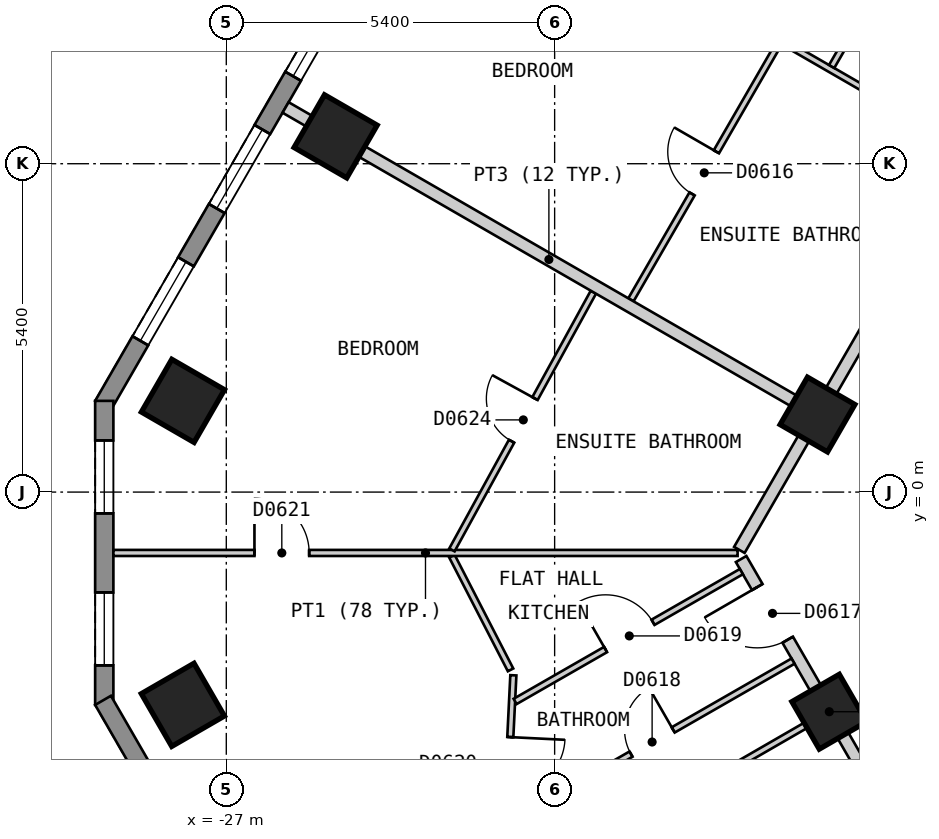
"""IFC4 building model, lengths in metres.
Left out: names, types, materials, properties, quantities, classifications, styles, units other than length and angle.
Written with IfcOpenShell. Run it as: python <this file> out.ifc"""

import sys

from ifc_helpers import new_model, si_unit, direction, frame, frame_2d, origin, origin_2d, place, context, subcontext, project, spatial, polyline, rectangle, outline, extrude, element, fill, save


model = new_model("IFC4")
c1 = context("Model", 3, precision=1e-05, world=origin(), true_north=direction((0.0, 1.0)))
c2 = subcontext(c1, "Body", "Model", "MODEL_VIEW")
j1 = project(units=[si_unit("LENGTHUNIT", "METRE"), si_unit("PLANEANGLEUNIT", "RADIAN")], contexts=[c1])
p1 = place(None, origin())
s1 = spatial("IfcSite", under=j1, at=p1, CompositionType="ELEMENT")
p2 = place(p1, origin())
s2 = spatial("IfcBuilding", under=s1, at=p2, CompositionType="ELEMENT")
p3 = place(p2, frame((0.0, 0.0, 81.0)))
s3 = spatial("IfcBuildingStorey", under=s2, at=p3, CompositionType="ELEMENT", Elevation=81.0)
for number, where, z_axis, x_axis in (
    (1, (-25.202, 5.85, 0.0), (0.0, 0.0, 1.0), (-0.5, -0.866, 0.0)),
    (2, (-27.713, 1.5, 0.0), (0.0, 0.0, 1.0), (-0.5, -0.866, 0.0)),
    (3, (-27.714, -3.499, 0.0), (0.0, 0.0, 1.0), (0.5, -0.866, 0.0)),
):
    element("IfcColumn", number, at=place(p3, frame(where, z_axis=z_axis, x_axis=x_axis)), inside=s3, PredefinedType="COLUMN", context=c2, shape_type="SweptSolid", body=[
        extrude(rectangle(XDim=1.0, YDim=1.0, at=origin_2d()), origin(), (0.0, 0.0, 1.0), 3.0),
    ])
for number, where, z_axis, x_axis in (
    (4, (-17.083, -3.612, 0.0), (0.0, 0.0, 1.0), (0.5, -0.866, 0.0)),
    (5, (-17.277, 1.275, 0.0), (0.0, 0.0, 1.0), (-0.5, -0.866, 0.0)),
):
    element("IfcColumn", number, at=place(p3, frame(where, z_axis=z_axis, x_axis=x_axis)), inside=s3, PredefinedType="COLUMN", context=c2, shape_type="SweptSolid", body=[
        extrude(rectangle(XDim=0.9, YDim=0.9, at=origin_2d()), origin(), (0.0, 0.0, 1.0), 3.0),
    ])
p4 = place(p3, frame((-15.747, 24.425, 0.0), z_axis=(0.0, 0.0, 1.0), x_axis=(-0.500027479704, -0.866009537788, 0.0)))
e6 = element("IfcWall", 6, at=p4, inside=s3, PredefinedType="SOLIDWALL", context=c2, shape_type="SweptSolid", body=[
    extrude(outline(polyline([(0.0, -0.15), (26.559, -0.15), (26.478, 0.15), (0.08, 0.15), (0.0, -0.15)])), origin(), (0.0, 0.0, 1.0), 2.7),
])
p5 = place(p4, frame((1.227, 0.0, 0.15)))
e7 = element("IfcOpeningElement", 7, at=p5, cuts=e6, PredefinedType="OPENING", context=c2, shape_type="SweptSolid", body=[
    extrude(rectangle(XDim=1.5, YDim=2.1, at=frame_2d((0.75, 1.05))), frame((0.0, 0.16, 0.0), z_axis=(0.0, -1.0, 0.0), x_axis=(1.0, 0.0, 0.0)), (0.0, 0.0, 1.0), 0.32),
])
p6 = place(p4, frame((3.739, 0.0, 0.15)))
e8 = element("IfcOpeningElement", 8, at=p6, cuts=e6, PredefinedType="OPENING", context=c2, shape_type="SweptSolid", body=[
    extrude(rectangle(XDim=1.5, YDim=2.1, at=frame_2d((0.75, 1.05))), frame((0.0, 0.16, 0.0), z_axis=(0.0, -1.0, 0.0), x_axis=(1.0, 0.0, 0.0)), (0.0, 0.0, 1.0), 0.32),
])
p7 = place(p4, frame((6.25, 0.0, 0.15)))
e9 = element("IfcOpeningElement", 9, at=p7, cuts=e6, PredefinedType="OPENING", context=c2, shape_type="SweptSolid", body=[
    extrude(rectangle(XDim=1.5, YDim=2.1, at=frame_2d((0.75, 1.05))), frame((0.0, 0.16, 0.0), z_axis=(0.0, -1.0, 0.0), x_axis=(1.0, 0.0, 0.0)), (0.0, 0.0, 1.0), 0.32),
])
p8 = place(p4, frame((8.761, 0.0, 0.15)))
e10 = element("IfcOpeningElement", 10, at=p8, cuts=e6, PredefinedType="OPENING", context=c2, shape_type="SweptSolid", body=[
    extrude(rectangle(XDim=1.5, YDim=2.1, at=frame_2d((0.75, 1.05))), frame((0.0, 0.16, 0.0), z_axis=(0.0, -1.0, 0.0), x_axis=(1.0, 0.0, 0.0)), (0.0, 0.0, 1.0), 0.32),
])
p9 = place(p4, frame((11.273, 0.0, 0.15)))
e11 = element("IfcOpeningElement", 11, at=p9, cuts=e6, PredefinedType="OPENING", context=c2, shape_type="SweptSolid", body=[
    extrude(rectangle(XDim=1.5, YDim=2.1, at=frame_2d((0.75, 1.05))), frame((0.0, 0.16, 0.0), z_axis=(0.0, -1.0, 0.0), x_axis=(1.0, 0.0, 0.0)), (0.0, 0.0, 1.0), 0.32),
])
p10 = place(p4, frame((13.785, 0.0, 0.15)))
e12 = element("IfcOpeningElement", 12, at=p10, cuts=e6, PredefinedType="OPENING", context=c2, shape_type="SweptSolid", body=[
    extrude(rectangle(XDim=1.5, YDim=2.1, at=frame_2d((0.75, 1.05))), frame((0.0, 0.16, 0.0), z_axis=(0.0, -1.0, 0.0), x_axis=(1.0, 0.0, 0.0)), (0.0, 0.0, 1.0), 0.32),
])
p11 = place(p4, frame((16.296, 0.0, 0.15)))
e13 = element("IfcOpeningElement", 13, at=p11, cuts=e6, PredefinedType="OPENING", context=c2, shape_type="SweptSolid", body=[
    extrude(rectangle(XDim=1.5, YDim=2.1, at=frame_2d((0.75, 1.05))), frame((0.0, 0.16, 0.0), z_axis=(0.0, -1.0, 0.0), x_axis=(1.0, 0.0, 0.0)), (0.0, 0.0, 1.0), 0.32),
])
p12 = place(p4, frame((18.807, 0.0, 0.15)))
e14 = element("IfcOpeningElement", 14, at=p12, cuts=e6, PredefinedType="OPENING", context=c2, shape_type="SweptSolid", body=[
    extrude(rectangle(XDim=1.5, YDim=2.1, at=frame_2d((0.75, 1.05))), frame((0.0, 0.16, 0.0), z_axis=(0.0, -1.0, 0.0), x_axis=(1.0, 0.0, 0.0)), (0.0, 0.0, 1.0), 0.32),
])
p13 = place(p4, frame((21.319, 0.0, 0.15)))
e15 = element("IfcOpeningElement", 15, at=p13, cuts=e6, PredefinedType="OPENING", context=c2, shape_type="SweptSolid", body=[
    extrude(rectangle(XDim=1.5, YDim=2.1, at=frame_2d((0.75, 1.05))), frame((0.0, 0.16, 0.0), z_axis=(0.0, -1.0, 0.0), x_axis=(1.0, 0.0, 0.0)), (0.0, 0.0, 1.0), 0.32),
])
p14 = place(p4, frame((23.831, 0.0, 0.15)))
e16 = element("IfcOpeningElement", 16, at=p14, cuts=e6, PredefinedType="OPENING", context=c2, shape_type="SweptSolid", body=[
    extrude(rectangle(XDim=1.5, YDim=2.1, at=frame_2d((0.75, 1.05))), frame((0.0, 0.16, 0.0), z_axis=(0.0, -1.0, 0.0), x_axis=(1.0, 0.0, 0.0)), (0.0, 0.0, 1.0), 0.32),
])
p15 = place(p3, frame((-29.007, 1.5, 0.0), z_axis=(0.0, 0.0, 1.0), x_axis=(0.0, -1.0, 0.0)))
e17 = element("IfcWall", 17, at=p15, inside=s3, PredefinedType="SOLIDWALL", context=c2, shape_type="SweptSolid", body=[
    extrude(outline(polyline([(0.0, -0.15), (5.0, -0.15), (4.92, 0.15), (0.08, 0.15), (0.0, -0.15)])), origin(), (0.0, 0.0, 1.0), 2.7),
])
p16 = place(p15, frame((0.65, 0.0, 0.15)))
e18 = element("IfcOpeningElement", 18, at=p16, cuts=e17, PredefinedType="OPENING", context=c2, shape_type="SweptSolid", body=[
    extrude(rectangle(XDim=1.2, YDim=2.1, at=frame_2d((0.6, 1.05))), frame((0.0, 0.16, 0.0), z_axis=(0.0, -1.0, 0.0), x_axis=(1.0, 0.0, 0.0)), (0.0, 0.0, 1.0), 0.32),
])
p17 = place(p15, frame((3.15, 0.0, 0.15)))
e19 = element("IfcOpeningElement", 19, at=p17, cuts=e17, PredefinedType="OPENING", context=c2, shape_type="SweptSolid", body=[
    extrude(rectangle(XDim=1.2, YDim=2.1, at=frame_2d((0.6, 1.05))), frame((0.0, 0.16, 0.0), z_axis=(0.0, -1.0, 0.0), x_axis=(1.0, 0.0, 0.0)), (0.0, 0.0, 1.0), 0.32),
])
p18 = place(p3, frame((-29.027, -3.425, 0.0), z_axis=(0.0, 0.0, 1.0), x_axis=(0.500035407905, -0.866004960056, 0.0)))
e20 = element("IfcWall", 20, at=p18, inside=s3, PredefinedType="SOLIDWALL", context=c2, shape_type="SweptSolid", body=[
    extrude(outline(polyline([(0.0, -0.15), (23.094, -0.15), (23.014, 0.15), (0.08, 0.15), (0.0, -0.15)])), origin(), (0.0, 0.0, 1.0), 2.7),
])
p19 = place(p18, frame((1.324, 0.0, 0.15)))
e21 = element("IfcOpeningElement", 21, at=p19, cuts=e20, PredefinedType="OPENING", context=c2, shape_type="SweptSolid", body=[
    extrude(rectangle(XDim=1.5, YDim=2.1, at=frame_2d((0.75, 1.05))), frame((0.0, 0.16, 0.0), z_axis=(0.0, -1.0, 0.0), x_axis=(1.0, 0.0, 0.0)), (0.0, 0.0, 1.0), 0.32),
])
p20 = place(p18, frame((4.031, 0.0, 0.15)))
e22 = element("IfcOpeningElement", 22, at=p20, cuts=e20, PredefinedType="OPENING", context=c2, shape_type="SweptSolid", body=[
    extrude(rectangle(XDim=1.5, YDim=2.1, at=frame_2d((0.75, 1.05))), frame((0.0, 0.16, 0.0), z_axis=(0.0, -1.0, 0.0), x_axis=(1.0, 0.0, 0.0)), (0.0, 0.0, 1.0), 0.32),
])
p21 = place(p18, frame((6.737, 0.0, 0.15)))
e23 = element("IfcOpeningElement", 23, at=p21, cuts=e20, PredefinedType="OPENING", context=c2, shape_type="SweptSolid", body=[
    extrude(rectangle(XDim=1.5, YDim=2.1, at=frame_2d((0.75, 1.05))), frame((0.0, 0.16, 0.0), z_axis=(0.0, -1.0, 0.0), x_axis=(1.0, 0.0, 0.0)), (0.0, 0.0, 1.0), 0.32),
])
p22 = place(p18, frame((9.444, 0.0, 0.15)))
e24 = element("IfcOpeningElement", 24, at=p22, cuts=e20, PredefinedType="OPENING", context=c2, shape_type="SweptSolid", body=[
    extrude(rectangle(XDim=1.5, YDim=2.1, at=frame_2d((0.75, 1.05))), frame((0.0, 0.16, 0.0), z_axis=(0.0, -1.0, 0.0), x_axis=(1.0, 0.0, 0.0)), (0.0, 0.0, 1.0), 0.32),
])
p23 = place(p18, frame((12.151, 0.0, 0.15)))
e25 = element("IfcOpeningElement", 25, at=p23, cuts=e20, PredefinedType="OPENING", context=c2, shape_type="SweptSolid", body=[
    extrude(rectangle(XDim=1.5, YDim=2.1, at=frame_2d((0.75, 1.05))), frame((0.0, 0.16, 0.0), z_axis=(0.0, -1.0, 0.0), x_axis=(1.0, 0.0, 0.0)), (0.0, 0.0, 1.0), 0.32),
])
p24 = place(p18, frame((14.857, 0.0, 0.15)))
e26 = element("IfcOpeningElement", 26, at=p24, cuts=e20, PredefinedType="OPENING", context=c2, shape_type="SweptSolid", body=[
    extrude(rectangle(XDim=1.5, YDim=2.1, at=frame_2d((0.75, 1.05))), frame((0.0, 0.16, 0.0), z_axis=(0.0, -1.0, 0.0), x_axis=(1.0, 0.0, 0.0)), (0.0, 0.0, 1.0), 0.32),
])
p25 = place(p18, frame((17.564, 0.0, 0.15)))
e27 = element("IfcOpeningElement", 27, at=p25, cuts=e20, PredefinedType="OPENING", context=c2, shape_type="SweptSolid", body=[
    extrude(rectangle(XDim=1.5, YDim=2.1, at=frame_2d((0.75, 1.05))), frame((0.0, 0.16, 0.0), z_axis=(0.0, -1.0, 0.0), x_axis=(1.0, 0.0, 0.0)), (0.0, 0.0, 1.0), 0.32),
])
p26 = place(p18, frame((20.27, 0.0, 0.15)))
e28 = element("IfcOpeningElement", 28, at=p26, cuts=e20, PredefinedType="OPENING", context=c2, shape_type="SweptSolid", body=[
    extrude(rectangle(XDim=1.5, YDim=2.1, at=frame_2d((0.75, 1.05))), frame((0.0, 0.16, 0.0), z_axis=(0.0, -1.0, 0.0), x_axis=(1.0, 0.0, 0.0)), (0.0, 0.0, 1.0), 0.32),
])
p27 = place(p3, frame((-18.533, -1.101, 0.0), z_axis=(0.0, 0.0, 1.0), x_axis=(0.500022085096, -0.866012652573, 0.0)))
e29 = element("IfcWall", 29, at=p27, inside=s3, PredefinedType="PARTITIONING", context=c2, shape_type="SweptSolid", body=[
    extrude(rectangle(XDim=6.066, YDim=0.2, at=frame_2d((3.033, 0.0))), origin(), (0.0, 0.0, 1.0), 2.7),
])
p28 = place(p27, frame((0.532, 0.0, 0.0)))
e30 = element("IfcOpeningElement", 30, at=p28, cuts=e29, PredefinedType="OPENING", context=c2, shape_type="SweptSolid", body=[
    extrude(rectangle(XDim=1.0, YDim=2.1, at=frame_2d((0.5, 1.05))), frame((0.0, 0.11, 0.0), z_axis=(0.0, -1.0, 0.0), x_axis=(1.0, 0.0, 0.0)), (0.0, 0.0, 1.0), 0.22),
])
p29 = place(p3, frame((-18.562, -0.951, 0.0), z_axis=(0.0, 0.0, 1.0), x_axis=(0.499992962407, 0.866029466902, 0.0)))
e31 = element("IfcWall", 31, at=p29, inside=s3, PredefinedType="PARTITIONING", context=c2, shape_type="SweptSolid", body=[
    extrude(rectangle(XDim=20.208, YDim=0.2, at=frame_2d((10.104, 0.0))), origin(), (0.0, 0.0, 1.0), 2.7),
])
p30 = place(p29, frame((9.604, 0.0, 0.0)))
e32 = element("IfcOpeningElement", 32, at=p30, cuts=e31, PredefinedType="OPENING", context=c2, shape_type="SweptSolid", body=[
    extrude(rectangle(XDim=1.0, YDim=2.1, at=frame_2d((0.5, 1.05))), frame((0.0, 0.11, 0.0), z_axis=(0.0, -1.0, 0.0), x_axis=(1.0, 0.0, 0.0)), (0.0, 0.0, 1.0), 0.22),
])
p31 = place(p3, frame((-23.289, -1.054, 0.0), z_axis=(0.0, 0.0, 1.0), x_axis=(0.458226112305, -0.888835659726, 0.0)))
e33 = element("IfcWall", 33, at=p31, inside=s3, PredefinedType="PARTITIONING", context=c2, shape_type="SweptSolid", body=[
    extrude(rectangle(XDim=2.104, YDim=0.1, at=frame_2d((1.052, 0.0))), origin(), (0.0, 0.0, 1.0), 2.7),
])
p32 = place(p3, frame((-23.513, 10.675, 0.0), z_axis=(0.0, 0.0, 1.0), x_axis=(0.866041268327, -0.499972520799, 0.0)))
e34 = element("IfcWall", 34, at=p32, inside=s3, PredefinedType="PARTITIONING", context=c2, shape_type="SweptSolid", body=[
    extrude(rectangle(XDim=10.0, YDim=0.1, at=frame_2d((5.0, 0.0))), origin(), (0.0, 0.0, 1.0), 2.7),
])
p33 = place(p32, frame((4.325, 0.0, 0.0)))
e35 = element("IfcOpeningElement", 35, at=p33, cuts=e34, PredefinedType="OPENING", context=c2, shape_type="SweptSolid", body=[
    extrude(rectangle(XDim=0.9, YDim=2.1, at=frame_2d((0.45, 1.05))), frame((0.0, 0.06, 0.0), z_axis=(0.0, -1.0, 0.0), x_axis=(1.0, 0.0, 0.0)), (0.0, 0.0, 1.0), 0.12),
])
p34 = place(p3, frame((-28.857, -1.001, 0.0), z_axis=(0.0, 0.0, 1.0), x_axis=(1.0, 0.0, 0.0)))
e36 = element("IfcWall", 36, at=p34, inside=s3, PredefinedType="PARTITIONING", context=c2, shape_type="SweptSolid", body=[
    extrude(rectangle(XDim=10.266, YDim=0.1, at=frame_2d((5.133, 0.0))), origin(), (0.0, 0.0, 1.0), 2.7),
])
p35 = place(p34, frame((2.32, 0.0, 0.0)))
e37 = element("IfcOpeningElement", 37, at=p35, cuts=e36, PredefinedType="OPENING", context=c2, shape_type="SweptSolid", body=[
    extrude(rectangle(XDim=0.9, YDim=2.1, at=frame_2d((0.45, 1.05))), frame((0.0, 0.06, 0.0), z_axis=(0.0, -1.0, 0.0), x_axis=(1.0, 0.0, 0.0)), (0.0, 0.0, 1.0), 0.12),
])
p36 = place(p3, frame((-17.044, 6.999, 0.0), z_axis=(0.0, 0.0, 1.0), x_axis=(0.500176309913, 0.865923587277, 0.0)))
e38 = element("IfcWall", 38, at=p36, inside=s3, PredefinedType="PARTITIONING", context=c2, shape_type="SweptSolid", body=[
    extrude(rectangle(XDim=3.213, YDim=0.1, at=frame_2d((1.606, 0.0))), origin(), (0.0, 0.0, 1.0), 2.7),
])
p37 = place(p3, frame((-20.345, 3.162, 0.0), z_axis=(0.0, 0.0, 1.0), x_axis=(0.499943653708, 0.866057932887, 0.0)))
e39 = element("IfcWall", 39, at=p37, inside=s3, PredefinedType="PARTITIONING", context=c2, shape_type="SweptSolid", body=[
    extrude(rectangle(XDim=4.873, YDim=0.1, at=frame_2d((2.436, 0.0))), origin(), (0.0, 0.0, 1.0), 2.7),
])
p38 = place(p37, frame((2.011, 0.0, 0.0)))
e40 = element("IfcOpeningElement", 40, at=p38, cuts=e39, PredefinedType="OPENING", context=c2, shape_type="SweptSolid", body=[
    extrude(rectangle(XDim=0.8, YDim=2.1, at=frame_2d((0.4, 1.05))), frame((0.0, 0.06, 0.0), z_axis=(0.0, -1.0, 0.0), x_axis=(1.0, 0.0, 0.0)), (0.0, 0.0, 1.0), 0.12),
])
p39 = place(p3, frame((-23.289, -0.951, 0.0), z_axis=(0.0, 0.0, 1.0), x_axis=(0.481164463081, 0.876630343684, 0.0)))
e41 = element("IfcWall", 41, at=p39, inside=s3, PredefinedType="PARTITIONING", context=c2, shape_type="SweptSolid", body=[
    extrude(rectangle(XDim=4.834, YDim=0.1, at=frame_2d((2.417, 0.0))), origin(), (0.0, 0.0, 1.0), 2.7),
])
p40 = place(p39, frame((2.039, 0.0, 0.0)))
e42 = element("IfcOpeningElement", 42, at=p40, cuts=e41, PredefinedType="OPENING", context=c2, shape_type="SweptSolid", body=[
    extrude(rectangle(XDim=0.8, YDim=2.1, at=frame_2d((0.4, 1.05))), frame((0.0, 0.06, 0.0), z_axis=(0.0, -1.0, 0.0), x_axis=(1.0, 0.0, 0.0)), (0.0, 0.0, 1.0), 0.12),
])
p41 = place(p3, frame((-22.399, -5.45, 0.0), z_axis=(0.0, 0.0, 1.0), x_axis=(0.049129140995, 0.998792434646, 0.0)))
e43 = element("IfcWall", 43, at=p41, inside=s3, PredefinedType="PARTITIONING", context=c2, shape_type="SweptSolid", body=[
    extrude(rectangle(XDim=2.44, YDim=0.1, at=frame_2d((1.22, 0.0))), origin(), (0.0, 0.0, 1.0), 2.7),
])
p42 = place(p41, frame((0.522, 0.0, 0.0)))
e44 = element("IfcOpeningElement", 44, at=p42, cuts=e43, PredefinedType="OPENING", context=c2, shape_type="SweptSolid", body=[
    extrude(rectangle(XDim=0.9, YDim=2.1, at=frame_2d((0.45, 1.05))), frame((0.0, 0.06, 0.0), z_axis=(0.0, -1.0, 0.0), x_axis=(1.0, 0.0, 0.0)), (0.0, 0.0, 1.0), 0.12),
])
p43 = place(p3, frame((-25.83, -8.662, 0.0), z_axis=(0.0, 0.0, 1.0), x_axis=(0.866022959057, 0.500004234368, 0.0)))
e45 = element("IfcWall", 45, at=p43, inside=s3, PredefinedType="PARTITIONING", context=c2, shape_type="SweptSolid", body=[
    extrude(rectangle(XDim=10.0, YDim=0.1, at=frame_2d((5.0, 0.0))), origin(), (0.0, 0.0, 1.0), 2.7),
])
p44 = place(p43, frame((1.501, 0.0, 0.0)))
e46 = element("IfcOpeningElement", 46, at=p44, cuts=e45, PredefinedType="OPENING", context=c2, shape_type="SweptSolid", body=[
    extrude(rectangle(XDim=0.9, YDim=2.1, at=frame_2d((0.45, 1.05))), frame((0.0, 0.06, 0.0), z_axis=(0.0, -1.0, 0.0), x_axis=(1.0, 0.0, 0.0)), (0.0, 0.0, 1.0), 0.12),
])
p45 = place(p3, frame((-22.401, -5.49, 0.0), z_axis=(0.0, 0.0, 1.0), x_axis=(0.867314404256, 0.497760709749, 0.0)))
e47 = element("IfcWall", 47, at=p45, inside=s3, PredefinedType="PARTITIONING", context=c2, shape_type="SweptSolid", body=[
    extrude(rectangle(XDim=5.444, YDim=0.1, at=frame_2d((2.722, 0.0))), origin(), (0.0, 0.0, 1.0), 2.7),
])
p46 = place(p45, frame((2.372, 0.0, 0.0)))
e48 = element("IfcOpeningElement", 48, at=p46, cuts=e47, PredefinedType="OPENING", context=c2, shape_type="SweptSolid", body=[
    extrude(rectangle(XDim=0.8, YDim=2.1, at=frame_2d((0.4, 1.05))), frame((0.0, 0.06, 0.0), z_axis=(0.0, -1.0, 0.0), x_axis=(1.0, 0.0, 0.0)), (0.0, 0.0, 1.0), 0.12),
])
p47 = place(p3, frame((-22.25, -3.443, 0.0), z_axis=(0.0, 0.0, 1.0), x_axis=(0.867362741349, 0.497676476156, 0.0)))
e49 = element("IfcWall", 49, at=p47, inside=s3, PredefinedType="PARTITIONING", context=c2, shape_type="SweptSolid", body=[
    extrude(rectangle(XDim=4.29, YDim=0.1, at=frame_2d((2.145, 0.0))), origin(), (0.0, 0.0, 1.0), 2.7),
])
p48 = place(p47, frame((1.715, 0.0, 0.0)))
e50 = element("IfcOpeningElement", 50, at=p48, cuts=e49, PredefinedType="OPENING", context=c2, shape_type="SweptSolid", body=[
    extrude(rectangle(XDim=0.9, YDim=2.1, at=frame_2d((0.45, 1.05))), frame((0.0, 0.06, 0.0), z_axis=(0.0, -1.0, 0.0), x_axis=(1.0, 0.0, 0.0)), (0.0, 0.0, 1.0), 0.12),
])
p49 = place(p3, frame((-26.025, 6.325, 0.0), z_axis=(0.0, 0.0, 1.0), x_axis=(0.866041268327, -0.499972520799, 0.0)))
e51 = element("IfcWall", 51, at=p49, inside=s3, PredefinedType="PARTITIONING", context=c2, shape_type="SweptSolid", body=[
    extrude(rectangle(XDim=10.0, YDim=0.2, at=frame_2d((5.0, 0.0))), origin(), (0.0, 0.0, 1.0), 2.7),
])
p50 = place(p12, origin())
e52 = element("IfcWindow", 52, at=p50, inside=s3, PartitioningType="SINGLE_PANEL", PredefinedType="WINDOW", context=c2, shape_type="SweptSolid", body=[
    extrude(rectangle(XDim=1.5, YDim=2.1, at=frame_2d((0.75, 1.05))), frame((0.0, 0.03, 0.0), z_axis=(0.0, -1.0, 0.0), x_axis=(1.0, 0.0, 0.0)), (0.0, 0.0, 1.0), 0.06),
])
fill(e14, e52)
p51 = place(p13, origin())
e53 = element("IfcWindow", 53, at=p51, inside=s3, PartitioningType="SINGLE_PANEL", PredefinedType="WINDOW", context=c2, shape_type="SweptSolid", body=[
    extrude(rectangle(XDim=1.5, YDim=2.1, at=frame_2d((0.75, 1.05))), frame((0.0, 0.03, 0.0), z_axis=(0.0, -1.0, 0.0), x_axis=(1.0, 0.0, 0.0)), (0.0, 0.0, 1.0), 0.06),
])
fill(e15, e53)
p52 = place(p14, origin())
e54 = element("IfcWindow", 54, at=p52, inside=s3, PartitioningType="SINGLE_PANEL", PredefinedType="WINDOW", context=c2, shape_type="SweptSolid", body=[
    extrude(rectangle(XDim=1.5, YDim=2.1, at=frame_2d((0.75, 1.05))), frame((0.0, 0.03, 0.0), z_axis=(0.0, -1.0, 0.0), x_axis=(1.0, 0.0, 0.0)), (0.0, 0.0, 1.0), 0.06),
])
fill(e16, e54)
p53 = place(p16, origin())
e55 = element("IfcWindow", 55, at=p53, inside=s3, PartitioningType="SINGLE_PANEL", PredefinedType="WINDOW", context=c2, shape_type="SweptSolid", body=[
    extrude(rectangle(XDim=1.2, YDim=2.1, at=frame_2d((0.6, 1.05))), frame((0.0, 0.03, 0.0), z_axis=(0.0, -1.0, 0.0), x_axis=(1.0, 0.0, 0.0)), (0.0, 0.0, 1.0), 0.06),
])
fill(e18, e55)
p54 = place(p17, origin())
e56 = element("IfcWindow", 56, at=p54, inside=s3, PartitioningType="SINGLE_PANEL", PredefinedType="WINDOW", context=c2, shape_type="SweptSolid", body=[
    extrude(rectangle(XDim=1.2, YDim=2.1, at=frame_2d((0.6, 1.05))), frame((0.0, 0.03, 0.0), z_axis=(0.0, -1.0, 0.0), x_axis=(1.0, 0.0, 0.0)), (0.0, 0.0, 1.0), 0.06),
])
fill(e19, e56)
p55 = place(p38, origin())
e57 = element("IfcDoor", 57, at=p55, inside=s3, OperationType="SINGLE_SWING_RIGHT", PredefinedType="DOOR", context=c2, shape_type="SweptSolid", body=[
    extrude(rectangle(XDim=0.8, YDim=2.1, at=frame_2d((0.4, 1.05))), frame((0.0, 0.025, 0.0), z_axis=(0.0, -1.0, 0.0), x_axis=(1.0, 0.0, 0.0)), (0.0, 0.0, 1.0), 0.05),
])
fill(e40, e57)
p56 = place(p28, origin())
e58 = element("IfcDoor", 58, at=p56, inside=s3, OperationType="SINGLE_SWING_LEFT", PredefinedType="DOOR", context=c2, shape_type="SweptSolid", body=[
    extrude(rectangle(XDim=1.0, YDim=2.1, at=frame_2d((0.5, 1.05))), frame((0.0, 0.025, 0.0), z_axis=(0.0, -1.0, 0.0), x_axis=(1.0, 0.0, 0.0)), (0.0, 0.0, 1.0), 0.05),
])
fill(e30, e58)
p57 = place(p46, origin())
e59 = element("IfcDoor", 59, at=p57, inside=s3, OperationType="SINGLE_SWING_RIGHT", PredefinedType="DOOR", context=c2, shape_type="SweptSolid", body=[
    extrude(rectangle(XDim=0.8, YDim=2.1, at=frame_2d((0.4, 1.05))), frame((0.0, 0.025, 0.0), z_axis=(0.0, -1.0, 0.0), x_axis=(1.0, 0.0, 0.0)), (0.0, 0.0, 1.0), 0.05),
])
fill(e48, e59)
p58 = place(p48, origin())
e60 = element("IfcDoor", 60, at=p58, inside=s3, OperationType="SINGLE_SWING_LEFT", PredefinedType="DOOR", context=c2, shape_type="SweptSolid", body=[
    extrude(rectangle(XDim=0.9, YDim=2.1, at=frame_2d((0.45, 1.05))), frame((0.0, 0.025, 0.0), z_axis=(0.0, -1.0, 0.0), x_axis=(1.0, 0.0, 0.0)), (0.0, 0.0, 1.0), 0.05),
])
fill(e50, e60)
p59 = place(p42, origin())
e61 = element("IfcDoor", 61, at=p59, inside=s3, OperationType="SINGLE_SWING_RIGHT", PredefinedType="DOOR", context=c2, shape_type="SweptSolid", body=[
    extrude(rectangle(XDim=0.9, YDim=2.1, at=frame_2d((0.45, 1.05))), frame((0.0, 0.025, 0.0), z_axis=(0.0, -1.0, 0.0), x_axis=(1.0, 0.0, 0.0)), (0.0, 0.0, 1.0), 0.05),
])
fill(e44, e61)
p60 = place(p35, origin())
e62 = element("IfcDoor", 62, at=p60, inside=s3, OperationType="SINGLE_SWING_LEFT", PredefinedType="DOOR", context=c2, shape_type="SweptSolid", body=[
    extrude(rectangle(XDim=0.9, YDim=2.1, at=frame_2d((0.45, 1.05))), frame((0.0, 0.025, 0.0), z_axis=(0.0, -1.0, 0.0), x_axis=(1.0, 0.0, 0.0)), (0.0, 0.0, 1.0), 0.05),
])
fill(e37, e62)
p61 = place(p40, origin())
e63 = element("IfcDoor", 63, at=p61, inside=s3, OperationType="SINGLE_SWING_RIGHT", PredefinedType="DOOR", context=c2, shape_type="SweptSolid", body=[
    extrude(rectangle(XDim=0.8, YDim=2.1, at=frame_2d((0.4, 1.05))), frame((0.0, 0.025, 0.0), z_axis=(0.0, -1.0, 0.0), x_axis=(1.0, 0.0, 0.0)), (0.0, 0.0, 1.0), 0.05),
])
fill(e42, e63)
save(model, sys.argv[1])
